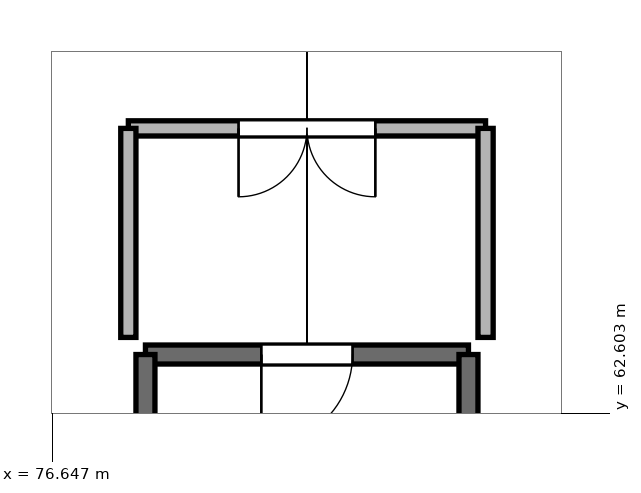
"""IFC4 building model, lengths in metres.
Left out: names, types, materials, properties, quantities, classifications, styles, units other than length and angle.
Written with IfcOpenShell. Run it as: python <this file> out.ifc"""

import sys

from ifc_helpers import new_model, si_unit, direction, frame, frame_2d, origin, place, context, subcontext, project, spatial, rectangle, extrude, element, fill, save


model = new_model("IFC4")
c1 = context("Model", 3, precision=1e-05, world=origin(), true_north=direction((0.0, 1.0)))
c2 = subcontext(c1, "Body", "Model", "MODEL_VIEW")
j1 = project(units=[si_unit("LENGTHUNIT", "METRE"), si_unit("PLANEANGLEUNIT", "RADIAN")], contexts=[c1])
p1 = place(None, origin())
s1 = spatial("IfcSite", under=j1, at=p1, CompositionType="ELEMENT")
p2 = place(p1, origin())
s2 = spatial("IfcBuilding", under=s1, at=p2, CompositionType="ELEMENT")
p3 = place(p2, frame((0.0, 0.0, 56.8)))
s3 = spatial("IfcBuildingStorey", under=s2, at=p3, CompositionType="ELEMENT", Elevation=56.8)
p4 = place(p3, frame((82.125, 63.375, 0.0), z_axis=(0.0, 0.0, 1.0), x_axis=(-1.0, 0.0, 0.0)))
e1 = element("IfcWall", 1, at=p4, inside=s3, PredefinedType="SHEAR", context=c2, shape_type="SweptSolid", body=[
    extrude(rectangle(XDim=4.25, YDim=0.25, at=frame_2d((2.125, 0.0))), origin(), (0.0, 0.0, 1.0), 3.04),
])
p5 = place(p4, frame((1.525, 0.0, 0.0)))
e2 = element("IfcOpeningElement", 2, at=p5, cuts=e1, PredefinedType="OPENING", context=c2, shape_type="SweptSolid", body=[
    extrude(rectangle(XDim=1.2, YDim=2.2, at=frame_2d((0.6, 1.1))), frame((0.0, 0.137, 0.0), z_axis=(0.0, -1.0, 0.0), x_axis=(1.0, 0.0, 0.0)), (0.0, 0.0, 1.0), 0.274),
])
for number, where, z_axis, x_axis in (
    (3, (77.875, 63.375, 0.0), (0.0, 0.0, 1.0), (0.0, -1.0, 0.0)),
    (4, (82.125, 56.175, 0.0), (0.0, 0.0, 1.0), (0.0, 1.0, 0.0)),
):
    element("IfcWall", number, at=place(p3, frame(where, z_axis=z_axis, x_axis=x_axis)), inside=s3, PredefinedType="SHEAR", context=c2, shape_type="SweptSolid", body=[
        extrude(rectangle(XDim=7.2, YDim=0.25, at=frame_2d((3.6, 0.0))), origin(), (0.0, 0.0, 1.0), 3.04),
    ])
p6 = place(p3, frame((77.65, 66.35, 0.0), z_axis=(0.0, 0.0, 1.0), x_axis=(1.0, 0.0, 0.0)))
e5 = element("IfcWall", 5, at=p6, inside=s3, PredefinedType="PARTITIONING", context=c2, shape_type="SweptSolid", body=[
    extrude(rectangle(XDim=4.7, YDim=0.2, at=frame_2d((2.35, 0.0))), origin(), (0.0, 0.0, 1.0), 2.53),
])
p7 = place(p6, frame((1.45, 0.0, 0.0)))
e6 = element("IfcOpeningElement", 6, at=p7, cuts=e5, PredefinedType="OPENING", context=c2, shape_type="SweptSolid", body=[
    extrude(rectangle(XDim=1.8, YDim=2.2, at=frame_2d((0.9, 1.1))), frame((0.0, 0.112, 0.0), z_axis=(0.0, -1.0, 0.0), x_axis=(1.0, 0.0, 0.0)), (0.0, 0.0, 1.0), 0.224),
])
for number, where, z_axis, x_axis in (
    (7, (77.65, 63.6, 0.0), (0.0, 0.0, 1.0), (0.0, 1.0, 0.0)),
    (8, (82.35, 63.6, 0.0), (0.0, 0.0, 1.0), (0.0, 1.0, 0.0)),
):
    element("IfcWall", number, at=place(p3, frame(where, z_axis=z_axis, x_axis=x_axis)), inside=s3, PredefinedType="PARTITIONING", context=c2, shape_type="SweptSolid", body=[
        extrude(rectangle(XDim=2.75, YDim=0.2, at=frame_2d((1.375, 0.0))), origin(), (0.0, 0.0, 1.0), 2.53),
    ])
p8 = place(p5, origin())
e9 = element("IfcDoor", 9, at=p8, inside=s3, OperationType="SINGLE_SWING_RIGHT", PredefinedType="DOOR", context=c2, shape_type="SweptSolid", body=[
    extrude(rectangle(XDim=1.2, YDim=2.2, at=frame_2d((0.6, 1.1))), frame((0.0, 0.025, 0.0), z_axis=(0.0, -1.0, 0.0), x_axis=(1.0, 0.0, 0.0)), (0.0, 0.0, 1.0), 0.05),
])
fill(e2, e9)
p9 = place(p7, frame((1.8, 0.0, 0.0), z_axis=(0.0, 0.0, 1.0), x_axis=(-1.0, 0.0, 0.0)))
e10 = element("IfcDoor", 10, at=p9, inside=s3, OperationType="DOUBLE_DOOR_SINGLE_SWING", PredefinedType="DOOR", context=c2, shape_type="SweptSolid", body=[
    extrude(rectangle(XDim=1.8, YDim=2.2, at=frame_2d((0.9, 1.1))), frame((0.0, 0.025, 0.0), z_axis=(0.0, -1.0, 0.0), x_axis=(1.0, 0.0, 0.0)), (0.0, 0.0, 1.0), 0.05),
])
fill(e6, e10)
save(model, sys.argv[1])
